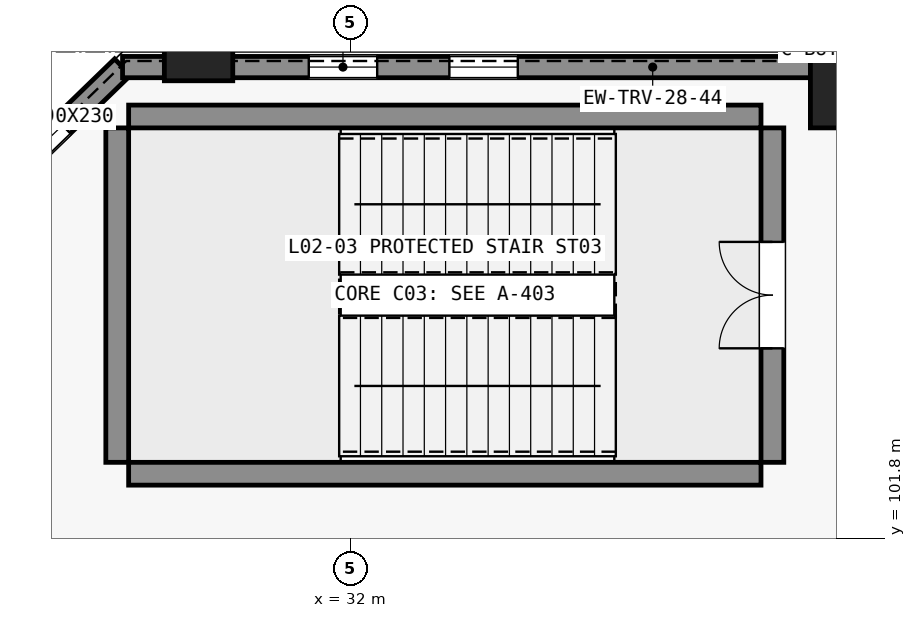
"""IFC4 building model, lengths in metres.
Left out: names, types, materials, properties, quantities, classifications, styles, units other than length and angle.
Written with IfcOpenShell. Run it as: python <this file> out.ifc"""

import sys

from ifc_helpers import new_model, si_unit, direction, frame, frame_2d, origin, origin_2d, place, context, subcontext, project, spatial, rectangle, extrude, element, fill, save


model = new_model("IFC4")
c1 = context("Model", 3, precision=1e-05, world=origin(), true_north=direction((0.0, 1.0)))
c2 = subcontext(c1, "Body", "Model", "MODEL_VIEW")
j1 = project(units=[si_unit("LENGTHUNIT", "METRE"), si_unit("PLANEANGLEUNIT", "RADIAN")], contexts=[c1])
p1 = place(None, origin())
s1 = spatial("IfcSite", under=j1, at=p1, CompositionType="ELEMENT")
p2 = place(p1, origin())
s2 = spatial("IfcBuilding", under=s1, at=p2, CompositionType="ELEMENT")
p3 = place(p2, frame((0.0, 0.0, 11.4)))
s3 = spatial("IfcBuildingStorey", under=s2, at=p3, CompositionType="ELEMENT", Elevation=11.4)
for number, where, z_axis, x_axis in (
    (1, (38.5, 107.8, 0.0), (0.0, 0.0, 1.0), (1.0, 0.0, 0.0)),
    (2, (30.0, 108.42, 0.0), (0.0, 0.0, 1.0), (1.0, 0.0, 0.0)),
):
    element("IfcColumn", number, at=place(p3, frame(where, z_axis=z_axis, x_axis=x_axis)), inside=s3, PredefinedType="PILASTER", context=c2, shape_type="SweptSolid", body=[
        extrude(rectangle(XDim=0.9, YDim=1.2, at=origin_2d()), origin(), (0.0, 0.0, 1.0), 4.8),
    ])
for number, where, z_axis, x_axis in (
    (3, (29.08, 102.65, 0.0), (0.0, 0.0, 1.0), (1.0, 0.0, 0.0)),
    (4, (29.08, 107.35, 0.0), (0.0, 0.0, 1.0), (1.0, 0.0, 0.0)),
):
    element("IfcWall", number, at=place(p3, frame(where, z_axis=z_axis, x_axis=x_axis)), inside=s3, PredefinedType="SHEAR", context=c2, shape_type="SweptSolid", body=[
        extrude(rectangle(XDim=8.32, YDim=0.3, at=frame_2d((4.16, 0.0))), origin(), (0.0, 0.0, 1.0), 4.8),
    ])
p4 = place(p3, frame((28.93, 102.8, 0.0), z_axis=(0.0, 0.0, 1.0), x_axis=(0.0, 1.0, 0.0)))
e5 = element("IfcWall", 5, at=p4, inside=s3, PredefinedType="SHEAR", context=c2, shape_type="SweptSolid", body=[
    extrude(rectangle(XDim=4.4, YDim=0.3, at=frame_2d((2.2, 0.0))), origin(), (0.0, 0.0, 1.0), 4.8),
])
p5 = place(p3, frame((37.55, 102.8, 0.0), z_axis=(0.0, 0.0, 1.0), x_axis=(0.0, 1.0, 0.0)))
e6 = element("IfcWall", 6, at=p5, inside=s3, PredefinedType="SHEAR", context=c2, shape_type="SweptSolid", body=[
    extrude(rectangle(XDim=4.4, YDim=0.3, at=frame_2d((2.2, 0.0))), origin(), (0.0, 0.0, 1.0), 4.8),
])
p6 = place(p5, frame((1.5, 0.0, 0.0)))
e7 = element("IfcOpeningElement", 7, at=p6, cuts=e6, PredefinedType="OPENING", context=c2, shape_type="SweptSolid", body=[
    extrude(rectangle(XDim=1.4, YDim=2.2, at=frame_2d((0.7, 1.1))), frame((0.0, 0.16, 0.0), z_axis=(0.0, -1.0, 0.0), x_axis=(1.0, 0.0, 0.0)), (0.0, 0.0, 1.0), 0.32),
])
p7 = place(p3, frame((29.0, 108.0, 0.0), z_axis=(0.0, 0.0, 1.0), x_axis=(-0.718244287729, -0.695791019736, 0.0)))
e8 = element("IfcWall", 8, at=p7, inside=s3, PredefinedType="STANDARD", context=c2, shape_type="SweptSolid", body=[
    extrude(rectangle(XDim=17.821, YDim=0.3, at=frame_2d((8.911, 0.0))), origin(), (0.0, 0.0, 1.0), 3.6),
])
p8 = place(p7, frame((1.1, 0.0, 0.95)))
e9 = element("IfcOpeningElement", 9, at=p8, cuts=e8, PredefinedType="OPENING", context=c2, shape_type="SweptSolid", body=[
    extrude(rectangle(XDim=0.9, YDim=2.3, at=frame_2d((0.45, 1.15))), frame((0.0, 0.16, 0.0), z_axis=(0.0, -1.0, 0.0), x_axis=(1.0, 0.0, 0.0)), (0.0, 0.0, 1.0), 0.32),
])
p9 = place(p7, frame((2.45, 0.0, 0.95)))
e10 = element("IfcOpeningElement", 10, at=p9, cuts=e8, PredefinedType="OPENING", context=c2, shape_type="SweptSolid", body=[
    extrude(rectangle(XDim=0.9, YDim=2.3, at=frame_2d((0.45, 1.15))), frame((0.0, 0.16, 0.0), z_axis=(0.0, -1.0, 0.0), x_axis=(1.0, 0.0, 0.0)), (0.0, 0.0, 1.0), 0.32),
])
p10 = place(p7, frame((4.3, 0.0, 0.95)))
e11 = element("IfcOpeningElement", 11, at=p10, cuts=e8, PredefinedType="OPENING", context=c2, shape_type="SweptSolid", body=[
    extrude(rectangle(XDim=0.9, YDim=2.3, at=frame_2d((0.45, 1.15))), frame((0.0, 0.16, 0.0), z_axis=(0.0, -1.0, 0.0), x_axis=(1.0, 0.0, 0.0)), (0.0, 0.0, 1.0), 0.32),
])
p11 = place(p7, frame((5.65, 0.0, 0.95)))
e12 = element("IfcOpeningElement", 12, at=p11, cuts=e8, PredefinedType="OPENING", context=c2, shape_type="SweptSolid", body=[
    extrude(rectangle(XDim=0.9, YDim=2.3, at=frame_2d((0.45, 1.15))), frame((0.0, 0.16, 0.0), z_axis=(0.0, -1.0, 0.0), x_axis=(1.0, 0.0, 0.0)), (0.0, 0.0, 1.0), 0.32),
])
p12 = place(p7, frame((7.5, 0.0, 0.95)))
e13 = element("IfcOpeningElement", 13, at=p12, cuts=e8, PredefinedType="OPENING", context=c2, shape_type="SweptSolid", body=[
    extrude(rectangle(XDim=0.9, YDim=2.3, at=frame_2d((0.45, 1.15))), frame((0.0, 0.16, 0.0), z_axis=(0.0, -1.0, 0.0), x_axis=(1.0, 0.0, 0.0)), (0.0, 0.0, 1.0), 0.32),
])
p13 = place(p7, frame((8.85, 0.0, 0.95)))
e14 = element("IfcOpeningElement", 14, at=p13, cuts=e8, PredefinedType="OPENING", context=c2, shape_type="SweptSolid", body=[
    extrude(rectangle(XDim=0.9, YDim=2.3, at=frame_2d((0.45, 1.15))), frame((0.0, 0.16, 0.0), z_axis=(0.0, -1.0, 0.0), x_axis=(1.0, 0.0, 0.0)), (0.0, 0.0, 1.0), 0.32),
])
p14 = place(p7, frame((10.7, 0.0, 0.95)))
e15 = element("IfcOpeningElement", 15, at=p14, cuts=e8, PredefinedType="OPENING", context=c2, shape_type="SweptSolid", body=[
    extrude(rectangle(XDim=0.9, YDim=2.3, at=frame_2d((0.45, 1.15))), frame((0.0, 0.16, 0.0), z_axis=(0.0, -1.0, 0.0), x_axis=(1.0, 0.0, 0.0)), (0.0, 0.0, 1.0), 0.32),
])
p15 = place(p7, frame((12.05, 0.0, 0.95)))
e16 = element("IfcOpeningElement", 16, at=p15, cuts=e8, PredefinedType="OPENING", context=c2, shape_type="SweptSolid", body=[
    extrude(rectangle(XDim=0.9, YDim=2.3, at=frame_2d((0.45, 1.15))), frame((0.0, 0.16, 0.0), z_axis=(0.0, -1.0, 0.0), x_axis=(1.0, 0.0, 0.0)), (0.0, 0.0, 1.0), 0.32),
])
p16 = place(p7, frame((13.9, 0.0, 0.95)))
e17 = element("IfcOpeningElement", 17, at=p16, cuts=e8, PredefinedType="OPENING", context=c2, shape_type="SweptSolid", body=[
    extrude(rectangle(XDim=0.9, YDim=2.3, at=frame_2d((0.45, 1.15))), frame((0.0, 0.16, 0.0), z_axis=(0.0, -1.0, 0.0), x_axis=(1.0, 0.0, 0.0)), (0.0, 0.0, 1.0), 0.32),
])
p17 = place(p7, frame((15.25, 0.0, 0.95)))
e18 = element("IfcOpeningElement", 18, at=p17, cuts=e8, PredefinedType="OPENING", context=c2, shape_type="SweptSolid", body=[
    extrude(rectangle(XDim=0.9, YDim=2.3, at=frame_2d((0.45, 1.15))), frame((0.0, 0.16, 0.0), z_axis=(0.0, -1.0, 0.0), x_axis=(1.0, 0.0, 0.0)), (0.0, 0.0, 1.0), 0.32),
])
p18 = place(p3, frame((29.0, 108.0, 0.0), z_axis=(0.0, 0.0, 1.0), x_axis=(1.0, 0.0, 0.0)))
e19 = element("IfcWall", 19, at=p18, inside=s3, PredefinedType="STANDARD", context=c2, shape_type="SweptSolid", body=[
    extrude(rectangle(XDim=13.95, YDim=0.28, at=frame_2d((6.975, 0.0))), origin(), (0.0, 0.0, 1.0), 4.45),
])
p19 = place(p18, frame((2.45, 0.0, 0.95)))
e20 = element("IfcOpeningElement", 20, at=p19, cuts=e19, PredefinedType="OPENING", context=c2, shape_type="SweptSolid", body=[
    extrude(rectangle(XDim=0.9, YDim=2.85, at=frame_2d((0.45, 1.425))), frame((0.0, 0.15, 0.0), z_axis=(0.0, -1.0, 0.0), x_axis=(1.0, 0.0, 0.0)), (0.0, 0.0, 1.0), 0.3),
])
p20 = place(p18, frame((4.3, 0.0, 0.95)))
e21 = element("IfcOpeningElement", 21, at=p20, cuts=e19, PredefinedType="OPENING", context=c2, shape_type="SweptSolid", body=[
    extrude(rectangle(XDim=0.9, YDim=2.85, at=frame_2d((0.45, 1.425))), frame((0.0, 0.15, 0.0), z_axis=(0.0, -1.0, 0.0), x_axis=(1.0, 0.0, 0.0)), (0.0, 0.0, 1.0), 0.3),
])
p21 = place(p8, origin())
e22 = element("IfcWindow", 22, at=p21, inside=s3, PartitioningType="DOUBLE_PANEL_VERTICAL", PredefinedType="WINDOW", context=c2, shape_type="SweptSolid", body=[
    extrude(rectangle(XDim=0.9, YDim=2.3, at=frame_2d((0.45, 1.15))), frame((0.0, 0.03, 0.0), z_axis=(0.0, -1.0, 0.0), x_axis=(1.0, 0.0, 0.0)), (0.0, 0.0, 1.0), 0.06),
])
fill(e9, e22)
p22 = place(p19, origin())
e23 = element("IfcWindow", 23, at=p22, inside=s3, PartitioningType="DOUBLE_PANEL_VERTICAL", PredefinedType="WINDOW", context=c2, shape_type="SweptSolid", body=[
    extrude(rectangle(XDim=0.9, YDim=2.85, at=frame_2d((0.45, 1.425))), frame((0.0, 0.03, 0.0), z_axis=(0.0, -1.0, 0.0), x_axis=(1.0, 0.0, 0.0)), (0.0, 0.0, 1.0), 0.06),
])
fill(e20, e23)
p23 = place(p20, origin())
e24 = element("IfcWindow", 24, at=p23, inside=s3, PartitioningType="DOUBLE_PANEL_VERTICAL", PredefinedType="WINDOW", context=c2, shape_type="SweptSolid", body=[
    extrude(rectangle(XDim=0.9, YDim=2.85, at=frame_2d((0.45, 1.425))), frame((0.0, 0.03, 0.0), z_axis=(0.0, -1.0, 0.0), x_axis=(1.0, 0.0, 0.0)), (0.0, 0.0, 1.0), 0.06),
])
fill(e21, e24)
p24 = place(p6, origin())
e25 = element("IfcDoor", 25, at=p24, inside=s3, OperationType="DOUBLE_DOOR_SINGLE_SWING", PredefinedType="DOOR", context=c2, shape_type="SweptSolid", body=[
    extrude(rectangle(XDim=1.4, YDim=2.2, at=frame_2d((0.7, 1.1))), frame((0.0, 0.025, 0.0), z_axis=(0.0, -1.0, 0.0), x_axis=(1.0, 0.0, 0.0)), (0.0, 0.0, 1.0), 0.05),
])
fill(e7, e25)
save(model, sys.argv[1])
